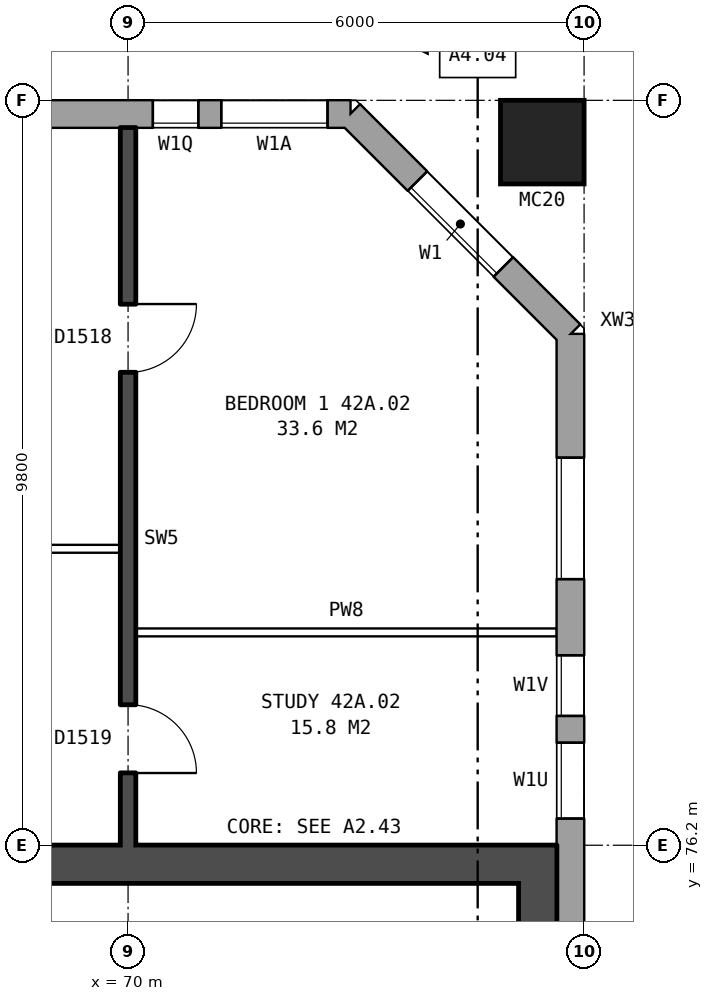
"""IFC4 building model, lengths in metres.
Left out: names, types, materials, properties, quantities, classifications, styles, units other than length and angle.
Written with IfcOpenShell. Run it as: python <this file> out.ifc"""

import sys

from ifc_helpers import new_model, si_unit, direction, frame, frame_2d, origin, origin_2d, place, context, subcontext, project, spatial, rectangle, hollow_rectangle, extrude, element, fill, save


model = new_model("IFC4")
c1 = context("Model", 3, precision=1e-05, world=origin(), true_north=direction((0.0, 1.0)))
c2 = subcontext(c1, "Body", "Model", "MODEL_VIEW")
j1 = project(units=[si_unit("LENGTHUNIT", "METRE"), si_unit("PLANEANGLEUNIT", "RADIAN")], contexts=[c1])
p1 = place(None, origin())
s1 = spatial("IfcSite", under=j1, at=p1, CompositionType="ELEMENT")
p2 = place(p1, origin())
s2 = spatial("IfcBuilding", under=s1, at=p2, CompositionType="ELEMENT")
p3 = place(p2, frame((0.0, 0.0, 151.6)))
s3 = spatial("IfcBuildingStorey", under=s2, at=p3, CompositionType="ELEMENT", Elevation=151.6)
p4 = place(p3, frame((75.45, 85.45, 0.0), z_axis=(0.0, 0.0, 1.0), x_axis=(1.0, 0.0, 0.0)))
e1 = element("IfcColumn", 1, at=p4, inside=s3, PredefinedType="COLUMN", context=c2, shape_type="SweptSolid", body=[
    extrude(hollow_rectangle(XDim=1.1, YDim=1.1, WallThickness=0.06, at=origin_2d()), origin(), (0.0, 0.0, 1.0), 3.1),
])
p5 = place(p3, frame((75.82, 57.075, 0.0), z_axis=(0.0, 0.0, 1.0), x_axis=(0.0, 1.0, 0.0)))
e2 = element("IfcWall", 2, at=p5, inside=s3, PredefinedType="STANDARD", context=c2, shape_type="SweptSolid", body=[
    extrude(rectangle(XDim=25.851, YDim=0.36, at=frame_2d((12.925, 0.0))), origin(), (0.0, 0.0, 1.0), 2.85),
])
p6 = place(p5, frame((1.625, 0.0, 0.8)))
e3 = element("IfcOpeningElement", 3, at=p6, cuts=e2, PredefinedType="OPENING", context=c2, shape_type="SweptSolid", body=[
    extrude(rectangle(XDim=1.6, YDim=1.8, at=frame_2d((0.8, 0.9))), frame((0.0, 0.19, 0.0), z_axis=(0.0, -1.0, 0.0), x_axis=(1.0, 0.0, 0.0)), (0.0, 0.0, 1.0), 0.38),
])
p7 = place(p5, frame((3.525, 0.0, 1.7)))
e4 = element("IfcOpeningElement", 4, at=p7, cuts=e2, PredefinedType="OPENING", context=c2, shape_type="SweptSolid", body=[
    extrude(rectangle(XDim=1.6, YDim=0.9, at=frame_2d((0.8, 0.45))), frame((0.0, 0.19, 0.0), z_axis=(0.0, -1.0, 0.0), x_axis=(1.0, 0.0, 0.0)), (0.0, 0.0, 1.0), 0.38),
])
p8 = place(p5, frame((19.475, 0.0, 0.35)))
e5 = element("IfcOpeningElement", 5, at=p8, cuts=e2, PredefinedType="OPENING", context=c2, shape_type="SweptSolid", body=[
    extrude(rectangle(XDim=1.0, YDim=0.9, at=frame_2d((0.5, 0.45))), frame((0.0, 0.19, 0.0), z_axis=(0.0, -1.0, 0.0), x_axis=(1.0, 0.0, 0.0)), (0.0, 0.0, 1.0), 0.38),
])
p9 = place(p5, frame((22.625, 0.0, 0.8)))
e6 = element("IfcOpeningElement", 6, at=p9, cuts=e2, PredefinedType="OPENING", context=c2, shape_type="SweptSolid", body=[
    extrude(rectangle(XDim=1.6, YDim=1.8, at=frame_2d((0.8, 0.9))), frame((0.0, 0.19, 0.0), z_axis=(0.0, -1.0, 0.0), x_axis=(1.0, 0.0, 0.0)), (0.0, 0.0, 1.0), 0.38),
])
p10 = place(p5, frame((20.825, 0.0, 1.65)))
e7 = element("IfcOpeningElement", 7, at=p10, cuts=e2, PredefinedType="OPENING", context=c2, shape_type="SweptSolid", body=[
    extrude(rectangle(XDim=0.8, YDim=0.9, at=frame_2d((0.4, 0.45))), frame((0.0, 0.19, 0.0), z_axis=(0.0, -1.0, 0.0), x_axis=(1.0, 0.0, 0.0)), (0.0, 0.0, 1.0), 0.38),
])
p11 = place(p3, frame((75.82, 82.925, 0.0), z_axis=(0.0, 0.0, 1.0), x_axis=(-0.707106781187, 0.707106781187, 0.0)))
e8 = element("IfcWall", 8, at=p11, inside=s3, PredefinedType="STANDARD", context=c2, shape_type="SweptSolid", body=[
    extrude(rectangle(XDim=4.094, YDim=0.36, at=frame_2d((2.047, 0.0))), origin(), (0.0, 0.0, 1.0), 2.85),
])
p12 = place(p11, frame((1.247, 0.0, 0.8)))
e9 = element("IfcOpeningElement", 9, at=p12, cuts=e8, PredefinedType="OPENING", context=c2, shape_type="SweptSolid", body=[
    extrude(rectangle(XDim=1.6, YDim=1.8, at=frame_2d((0.8, 0.9))), frame((0.0, 0.19, 0.0), z_axis=(0.0, -1.0, 0.0), x_axis=(1.0, 0.0, 0.0)), (0.0, 0.0, 1.0), 0.38),
])
p13 = place(p3, frame((72.925, 85.82, 0.0), z_axis=(0.0, 0.0, 1.0), x_axis=(-1.0, 0.0, 0.0)))
e10 = element("IfcWall", 10, at=p13, inside=s3, PredefinedType="STANDARD", context=c2, shape_type="SweptSolid", body=[
    extrude(rectangle(XDim=41.351, YDim=0.36, at=frame_2d((20.675, 0.0))), origin(), (0.0, 0.0, 1.0), 2.85),
])
p14 = place(p13, frame((0.3, 0.0, 0.8)))
e11 = element("IfcOpeningElement", 11, at=p14, cuts=e10, PredefinedType="OPENING", context=c2, shape_type="SweptSolid", body=[
    extrude(rectangle(XDim=1.4, YDim=1.8, at=frame_2d((0.7, 0.9))), frame((0.0, 0.19, 0.0), z_axis=(0.0, -1.0, 0.0), x_axis=(1.0, 0.0, 0.0)), (0.0, 0.0, 1.0), 0.38),
])
p15 = place(p13, frame((4.225, 0.0, 0.8)))
e12 = element("IfcOpeningElement", 12, at=p15, cuts=e10, PredefinedType="OPENING", context=c2, shape_type="SweptSolid", body=[
    extrude(rectangle(XDim=1.0, YDim=0.9, at=frame_2d((0.5, 0.45))), frame((0.0, 0.19, 0.0), z_axis=(0.0, -1.0, 0.0), x_axis=(1.0, 0.0, 0.0)), (0.0, 0.0, 1.0), 0.38),
])
p16 = place(p13, frame((6.625, 0.0, 0.8)))
e13 = element("IfcOpeningElement", 13, at=p16, cuts=e10, PredefinedType="OPENING", context=c2, shape_type="SweptSolid", body=[
    extrude(rectangle(XDim=1.6, YDim=1.8, at=frame_2d((0.8, 0.9))), frame((0.0, 0.19, 0.0), z_axis=(0.0, -1.0, 0.0), x_axis=(1.0, 0.0, 0.0)), (0.0, 0.0, 1.0), 0.38),
])
p17 = place(p13, frame((9.625, 0.0, 0.8)))
e14 = element("IfcOpeningElement", 14, at=p17, cuts=e10, PredefinedType="OPENING", context=c2, shape_type="SweptSolid", body=[
    extrude(rectangle(XDim=1.6, YDim=1.8, at=frame_2d((0.8, 0.9))), frame((0.0, 0.19, 0.0), z_axis=(0.0, -1.0, 0.0), x_axis=(1.0, 0.0, 0.0)), (0.0, 0.0, 1.0), 0.38),
])
p18 = place(p13, frame((12.625, 0.0, 0.8)))
e15 = element("IfcOpeningElement", 15, at=p18, cuts=e10, PredefinedType="OPENING", context=c2, shape_type="SweptSolid", body=[
    extrude(rectangle(XDim=1.6, YDim=1.8, at=frame_2d((0.8, 0.9))), frame((0.0, 0.19, 0.0), z_axis=(0.0, -1.0, 0.0), x_axis=(1.0, 0.0, 0.0)), (0.0, 0.0, 1.0), 0.38),
])
p19 = place(p13, frame((15.625, 0.0, 0.8)))
e16 = element("IfcOpeningElement", 16, at=p19, cuts=e10, PredefinedType="OPENING", context=c2, shape_type="SweptSolid", body=[
    extrude(rectangle(XDim=1.6, YDim=1.8, at=frame_2d((0.8, 0.9))), frame((0.0, 0.19, 0.0), z_axis=(0.0, -1.0, 0.0), x_axis=(1.0, 0.0, 0.0)), (0.0, 0.0, 1.0), 0.38),
])
p20 = place(p13, frame((18.625, 0.0, 0.8)))
e17 = element("IfcOpeningElement", 17, at=p20, cuts=e10, PredefinedType="OPENING", context=c2, shape_type="SweptSolid", body=[
    extrude(rectangle(XDim=1.6, YDim=1.8, at=frame_2d((0.8, 0.9))), frame((0.0, 0.19, 0.0), z_axis=(0.0, -1.0, 0.0), x_axis=(1.0, 0.0, 0.0)), (0.0, 0.0, 1.0), 0.38),
])
p21 = place(p13, frame((21.625, 0.0, 0.8)))
e18 = element("IfcOpeningElement", 18, at=p21, cuts=e10, PredefinedType="OPENING", context=c2, shape_type="SweptSolid", body=[
    extrude(rectangle(XDim=1.6, YDim=1.8, at=frame_2d((0.8, 0.9))), frame((0.0, 0.19, 0.0), z_axis=(0.0, -1.0, 0.0), x_axis=(1.0, 0.0, 0.0)), (0.0, 0.0, 1.0), 0.38),
])
p22 = place(p13, frame((24.625, 0.0, 0.8)))
e19 = element("IfcOpeningElement", 19, at=p22, cuts=e10, PredefinedType="OPENING", context=c2, shape_type="SweptSolid", body=[
    extrude(rectangle(XDim=1.6, YDim=1.8, at=frame_2d((0.8, 0.9))), frame((0.0, 0.19, 0.0), z_axis=(0.0, -1.0, 0.0), x_axis=(1.0, 0.0, 0.0)), (0.0, 0.0, 1.0), 0.38),
])
p23 = place(p13, frame((27.625, 0.0, 0.8)))
e20 = element("IfcOpeningElement", 20, at=p23, cuts=e10, PredefinedType="OPENING", context=c2, shape_type="SweptSolid", body=[
    extrude(rectangle(XDim=1.6, YDim=1.8, at=frame_2d((0.8, 0.9))), frame((0.0, 0.19, 0.0), z_axis=(0.0, -1.0, 0.0), x_axis=(1.0, 0.0, 0.0)), (0.0, 0.0, 1.0), 0.38),
])
p24 = place(p13, frame((30.625, 0.0, 0.8)))
e21 = element("IfcOpeningElement", 21, at=p24, cuts=e10, PredefinedType="OPENING", context=c2, shape_type="SweptSolid", body=[
    extrude(rectangle(XDim=1.6, YDim=1.8, at=frame_2d((0.8, 0.9))), frame((0.0, 0.19, 0.0), z_axis=(0.0, -1.0, 0.0), x_axis=(1.0, 0.0, 0.0)), (0.0, 0.0, 1.0), 0.38),
])
p25 = place(p13, frame((33.625, 0.0, 0.8)))
e22 = element("IfcOpeningElement", 22, at=p25, cuts=e10, PredefinedType="OPENING", context=c2, shape_type="SweptSolid", body=[
    extrude(rectangle(XDim=1.6, YDim=1.8, at=frame_2d((0.8, 0.9))), frame((0.0, 0.19, 0.0), z_axis=(0.0, -1.0, 0.0), x_axis=(1.0, 0.0, 0.0)), (0.0, 0.0, 1.0), 0.38),
])
p26 = place(p13, frame((35.525, 0.0, 0.8)))
e23 = element("IfcOpeningElement", 23, at=p26, cuts=e10, PredefinedType="OPENING", context=c2, shape_type="SweptSolid", body=[
    extrude(rectangle(XDim=1.2, YDim=1.2, at=frame_2d((0.6, 0.6))), frame((0.0, 0.19, 0.0), z_axis=(0.0, -1.0, 0.0), x_axis=(1.0, 0.0, 0.0)), (0.0, 0.0, 1.0), 0.38),
])
p27 = place(p13, frame((2.0, 0.0, 1.4)))
e24 = element("IfcOpeningElement", 24, at=p27, cuts=e10, PredefinedType="OPENING", context=c2, shape_type="SweptSolid", body=[
    extrude(rectangle(XDim=0.6, YDim=1.2, at=frame_2d((0.3, 0.6))), frame((0.0, 0.19, 0.0), z_axis=(0.0, -1.0, 0.0), x_axis=(1.0, 0.0, 0.0)), (0.0, 0.0, 1.0), 0.38),
])
p28 = place(p13, frame((5.525, 0.0, 0.8)))
e25 = element("IfcOpeningElement", 25, at=p28, cuts=e10, PredefinedType="OPENING", context=c2, shape_type="SweptSolid", body=[
    extrude(rectangle(XDim=0.8, YDim=1.8, at=frame_2d((0.4, 0.9))), frame((0.0, 0.19, 0.0), z_axis=(0.0, -1.0, 0.0), x_axis=(1.0, 0.0, 0.0)), (0.0, 0.0, 1.0), 0.38),
])
p29 = place(p3, frame((75.39, 63.8, 0.0), z_axis=(0.0, 0.0, 1.0), x_axis=(0.0, 1.0, 0.0)))
e26 = element("IfcWall", 26, at=p29, inside=s3, PredefinedType="SHEAR", context=c2, shape_type="SweptSolid", body=[
    extrude(rectangle(XDim=12.4, YDim=0.5, at=frame_2d((6.2, 0.0))), origin(), (0.0, 0.0, 1.0), 2.85),
])
p30 = place(p3, frame((67.14, 75.95, 0.0), z_axis=(0.0, 0.0, 1.0), x_axis=(1.0, 0.0, 0.0)))
e27 = element("IfcWall", 27, at=p30, inside=s3, PredefinedType="SHEAR", context=c2, shape_type="SweptSolid", body=[
    extrude(rectangle(XDim=8.0, YDim=0.5, at=frame_2d((4.0, 0.0))), origin(), (0.0, 0.0, 1.0), 2.85),
])
p31 = place(p3, frame((70.1, 79.0, 0.0), z_axis=(0.0, 0.0, 1.0), x_axis=(1.0, 0.0, 0.0)))
e28 = element("IfcWall", 28, at=p31, inside=s3, PredefinedType="PARTITIONING", context=c2, shape_type="SweptSolid", body=[
    extrude(rectangle(XDim=5.54, YDim=0.1, at=frame_2d((2.77, 0.0))), origin(), (0.0, 0.0, 1.0), 2.85),
])
p32 = place(p3, frame((64.1, 80.1, 0.0), z_axis=(0.0, 0.0, 1.0), x_axis=(1.0, 0.0, 0.0)))
e29 = element("IfcWall", 29, at=p32, inside=s3, PredefinedType="PARTITIONING", context=c2, shape_type="SweptSolid", body=[
    extrude(rectangle(XDim=5.8, YDim=0.1, at=frame_2d((2.9, 0.0))), origin(), (0.0, 0.0, 1.0), 2.85),
])
p33 = place(p32, frame((3.6, 0.0, 0.0)))
e30 = element("IfcOpeningElement", 30, at=p33, cuts=e29, PredefinedType="OPENING", context=c2, shape_type="SweptSolid", body=[
    extrude(rectangle(XDim=0.9, YDim=2.1, at=frame_2d((0.45, 1.05))), frame((0.0, 0.06, 0.0), z_axis=(0.0, -1.0, 0.0), x_axis=(1.0, 0.0, 0.0)), (0.0, 0.0, 1.0), 0.12),
])
p34 = place(p32, frame((0.7, 0.0, 0.0)))
e31 = element("IfcOpeningElement", 31, at=p34, cuts=e29, PredefinedType="OPENING", context=c2, shape_type="SweptSolid", body=[
    extrude(rectangle(XDim=0.9, YDim=2.1, at=frame_2d((0.45, 1.05))), frame((0.0, 0.06, 0.0), z_axis=(0.0, -1.0, 0.0), x_axis=(1.0, 0.0, 0.0)), (0.0, 0.0, 1.0), 0.12),
])
p35 = place(p3, frame((70.0, 76.2, 0.0), z_axis=(0.0, 0.0, 1.0), x_axis=(0.0, 1.0, 0.0)))
e32 = element("IfcWall", 32, at=p35, inside=s3, PredefinedType="SOLIDWALL", context=c2, shape_type="SweptSolid", body=[
    extrude(rectangle(XDim=9.44, YDim=0.2, at=frame_2d((4.72, 0.0))), origin(), (0.0, 0.0, 1.0), 2.85),
])
p36 = place(p35, frame((6.22, 0.0, 0.0)))
e33 = element("IfcOpeningElement", 33, at=p36, cuts=e32, PredefinedType="OPENING", context=c2, shape_type="SweptSolid", body=[
    extrude(rectangle(XDim=0.9, YDim=2.1, at=frame_2d((0.45, 1.05))), frame((0.0, 0.11, 0.0), z_axis=(0.0, -1.0, 0.0), x_axis=(1.0, 0.0, 0.0)), (0.0, 0.0, 1.0), 0.22),
])
p37 = place(p35, frame((0.95, 0.0, 0.0)))
e34 = element("IfcOpeningElement", 34, at=p37, cuts=e32, PredefinedType="OPENING", context=c2, shape_type="SweptSolid", body=[
    extrude(rectangle(XDim=0.9, YDim=2.1, at=frame_2d((0.45, 1.05))), frame((0.0, 0.11, 0.0), z_axis=(0.0, -1.0, 0.0), x_axis=(1.0, 0.0, 0.0)), (0.0, 0.0, 1.0), 0.22),
])
p38 = place(p8, origin())
e35 = element("IfcWindow", 35, at=p38, inside=s3, PartitioningType="SINGLE_PANEL", PredefinedType="WINDOW", context=c2, shape_type="SweptSolid", body=[
    extrude(rectangle(XDim=1.0, YDim=0.9, at=frame_2d((0.5, 0.45))), frame((0.0, 0.15, 0.0), z_axis=(0.0, -1.0, 0.0), x_axis=(1.0, 0.0, 0.0)), (0.0, 0.0, 1.0), 0.06),
])
fill(e5, e35)
p39 = place(p9, origin())
e36 = element("IfcWindow", 36, at=p39, inside=s3, PartitioningType="SINGLE_PANEL", PredefinedType="WINDOW", context=c2, shape_type="SweptSolid", body=[
    extrude(rectangle(XDim=1.6, YDim=1.8, at=frame_2d((0.8, 0.9))), frame((0.0, 0.15, 0.0), z_axis=(0.0, -1.0, 0.0), x_axis=(1.0, 0.0, 0.0)), (0.0, 0.0, 1.0), 0.06),
])
fill(e6, e36)
p40 = place(p12, origin())
e37 = element("IfcWindow", 37, at=p40, inside=s3, PartitioningType="SINGLE_PANEL", PredefinedType="WINDOW", context=c2, shape_type="SweptSolid", body=[
    extrude(rectangle(XDim=1.6, YDim=1.8, at=frame_2d((0.8, 0.9))), frame((0.0, 0.15, 0.0), z_axis=(0.0, -1.0, 0.0), x_axis=(1.0, 0.0, 0.0)), (0.0, 0.0, 1.0), 0.06),
])
fill(e9, e37)
p41 = place(p14, origin())
e38 = element("IfcWindow", 38, at=p41, inside=s3, PartitioningType="SINGLE_PANEL", PredefinedType="WINDOW", context=c2, shape_type="SweptSolid", body=[
    extrude(rectangle(XDim=1.4, YDim=1.8, at=frame_2d((0.7, 0.9))), frame((0.0, 0.15, 0.0), z_axis=(0.0, -1.0, 0.0), x_axis=(1.0, 0.0, 0.0)), (0.0, 0.0, 1.0), 0.06),
])
fill(e11, e38)
p42 = place(p36, frame((0.9, 0.0, 0.0), z_axis=(0.0, 0.0, 1.0), x_axis=(-1.0, 0.0, 0.0)))
e39 = element("IfcDoor", 39, at=p42, inside=s3, OperationType="SINGLE_SWING_LEFT", PredefinedType="DOOR", context=c2, shape_type="SweptSolid", body=[
    extrude(rectangle(XDim=0.9, YDim=2.1, at=frame_2d((0.45, 1.05))), frame((0.0, 0.025, 0.0), z_axis=(0.0, -1.0, 0.0), x_axis=(1.0, 0.0, 0.0)), (0.0, 0.0, 1.0), 0.05),
])
fill(e33, e39)
p43 = place(p37, frame((0.9, 0.0, 0.0), z_axis=(0.0, 0.0, 1.0), x_axis=(-1.0, 0.0, 0.0)))
e40 = element("IfcDoor", 40, at=p43, inside=s3, OperationType="SINGLE_SWING_RIGHT", PredefinedType="DOOR", context=c2, shape_type="SweptSolid", body=[
    extrude(rectangle(XDim=0.9, YDim=2.1, at=frame_2d((0.45, 1.05))), frame((0.0, 0.025, 0.0), z_axis=(0.0, -1.0, 0.0), x_axis=(1.0, 0.0, 0.0)), (0.0, 0.0, 1.0), 0.05),
])
fill(e34, e40)
p44 = place(p10, origin())
e41 = element("IfcWindow", 41, at=p44, inside=s3, PartitioningType="SINGLE_PANEL", PredefinedType="WINDOW", context=c2, shape_type="SweptSolid", body=[
    extrude(rectangle(XDim=0.8, YDim=0.9, at=frame_2d((0.4, 0.45))), frame((0.0, 0.15, 0.0), z_axis=(0.0, -1.0, 0.0), x_axis=(1.0, 0.0, 0.0)), (0.0, 0.0, 1.0), 0.06),
])
fill(e7, e41)
p45 = place(p27, origin())
e42 = element("IfcWindow", 42, at=p45, inside=s3, PartitioningType="SINGLE_PANEL", PredefinedType="WINDOW", context=c2, shape_type="SweptSolid", body=[
    extrude(rectangle(XDim=0.6, YDim=1.2, at=frame_2d((0.3, 0.6))), frame((0.0, 0.15, 0.0), z_axis=(0.0, -1.0, 0.0), x_axis=(1.0, 0.0, 0.0)), (0.0, 0.0, 1.0), 0.06),
])
fill(e24, e42)
save(model, sys.argv[1])
